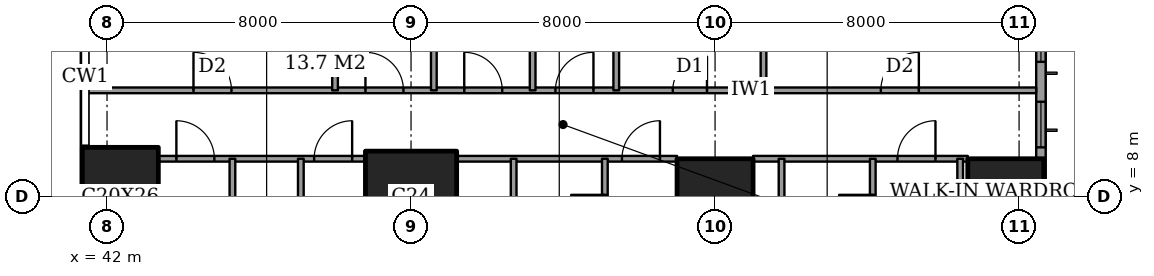
"""IFC4 building model, lengths in metres.
Left out: names, types, materials, properties, quantities, classifications, styles, units other than length and angle.
Written with IfcOpenShell. Run it as: python <this file> out.ifc"""

import sys

from ifc_helpers import new_model, si_unit, direction, frame, frame_2d, origin, origin_2d, place, context, subcontext, project, spatial, rectangle, extrude, element, fill, save


model = new_model("IFC4")
c1 = context("Model", 3, precision=1e-05, world=origin(), true_north=direction((0.0, 1.0)))
c2 = subcontext(c1, "Body", "Model", "MODEL_VIEW")
j1 = project(units=[si_unit("LENGTHUNIT", "METRE"), si_unit("PLANEANGLEUNIT", "RADIAN")], contexts=[c1])
p1 = place(None, origin())
s1 = spatial("IfcSite", under=j1, at=p1, CompositionType="ELEMENT")
p2 = place(p1, origin())
s2 = spatial("IfcBuilding", under=s1, at=p2, CompositionType="ELEMENT")
p3 = place(p2, frame((0.0, 0.0, 125.0)))
s3 = spatial("IfcBuildingStorey", under=s2, at=p3, CompositionType="ELEMENT", Elevation=125.0)
p4 = place(p3, frame((42.35, 8.0, 0.0), z_axis=(0.0, 0.0, 1.0), x_axis=(1.0, 0.0, 0.0)))
e1 = element("IfcColumn", 1, at=p4, inside=s3, PredefinedType="COLUMN", context=c2, shape_type="SweptSolid", body=[
    extrude(rectangle(XDim=2.0, YDim=2.6, at=origin_2d()), origin(), (0.0, 0.0, 1.0), 3.6),
])
p5 = place(p3, frame((50.0, 8.0, 0.0), z_axis=(0.0, 0.0, 1.0), x_axis=(1.0, 0.0, 0.0)))
e2 = element("IfcColumn", 2, at=p5, inside=s3, PredefinedType="COLUMN", context=c2, shape_type="SweptSolid", body=[
    extrude(rectangle(XDim=2.4, YDim=2.4, at=origin_2d()), origin(), (0.0, 0.0, 1.0), 3.6),
])
for number, where, z_axis, x_axis in (
    (3, (58.0, 8.0, 0.0), (0.0, 0.0, 1.0), (1.0, 0.0, 0.0)),
    (4, (65.65, 8.0, 0.0), (0.0, 0.0, 1.0), (1.0, 0.0, 0.0)),
):
    element("IfcColumn", number, at=place(p3, frame(where, z_axis=z_axis, x_axis=x_axis)), inside=s3, PredefinedType="COLUMN", context=c2, shape_type="SweptSolid", body=[
        extrude(rectangle(XDim=2.0, YDim=2.0, at=origin_2d()), origin(), (0.0, 0.0, 1.0), 3.6),
    ])
p6 = place(p3, frame((66.575, 3.175, 0.0), z_axis=(0.0, 0.0, 1.0), x_axis=(0.0, 1.0, 0.0)))
e5 = element("IfcWall", 5, at=p6, inside=s3, PredefinedType="SOLIDWALL", context=c2, shape_type="SweptSolid", body=[
    extrude(rectangle(XDim=41.65, YDim=0.25, at=frame_2d((20.825, 0.0))), origin(), (0.0, 0.0, 1.0), 3.6),
])
p7 = place(p6, frame((0.775, 0.0, 0.4)))
e6 = element("IfcOpeningElement", 6, at=p7, cuts=e5, PredefinedType="OPENING", context=c2, shape_type="SweptSolid", body=[
    extrude(rectangle(XDim=2.4, YDim=2.2, at=frame_2d((1.2, 1.1))), frame((0.0, 0.135, 0.0), z_axis=(0.0, -1.0, 0.0), x_axis=(1.0, 0.0, 0.0)), (0.0, 0.0, 1.0), 0.27),
])
p8 = place(p6, frame((6.125, 0.0, 0.4)))
e7 = element("IfcOpeningElement", 7, at=p8, cuts=e5, PredefinedType="OPENING", context=c2, shape_type="SweptSolid", body=[
    extrude(rectangle(XDim=1.2, YDim=2.2, at=frame_2d((0.6, 1.1))), frame((0.0, 0.135, 0.0), z_axis=(0.0, -1.0, 0.0), x_axis=(1.0, 0.0, 0.0)), (0.0, 0.0, 1.0), 0.27),
])
p9 = place(p6, frame((8.375, 0.0, 0.4)))
e8 = element("IfcOpeningElement", 8, at=p9, cuts=e5, PredefinedType="OPENING", context=c2, shape_type="SweptSolid", body=[
    extrude(rectangle(XDim=2.4, YDim=2.2, at=frame_2d((1.2, 1.1))), frame((0.0, 0.135, 0.0), z_axis=(0.0, -1.0, 0.0), x_axis=(1.0, 0.0, 0.0)), (0.0, 0.0, 1.0), 0.27),
])
p10 = place(p6, frame((15.775, 0.0, 0.4)))
e9 = element("IfcOpeningElement", 9, at=p10, cuts=e5, PredefinedType="OPENING", context=c2, shape_type="SweptSolid", body=[
    extrude(rectangle(XDim=2.4, YDim=2.2, at=frame_2d((1.2, 1.1))), frame((0.0, 0.135, 0.0), z_axis=(0.0, -1.0, 0.0), x_axis=(1.0, 0.0, 0.0)), (0.0, 0.0, 1.0), 0.27),
])
p11 = place(p6, frame((23.475, 0.0, 0.4)))
e10 = element("IfcOpeningElement", 10, at=p11, cuts=e5, PredefinedType="OPENING", context=c2, shape_type="SweptSolid", body=[
    extrude(rectangle(XDim=2.4, YDim=2.2, at=frame_2d((1.2, 1.1))), frame((0.0, 0.135, 0.0), z_axis=(0.0, -1.0, 0.0), x_axis=(1.0, 0.0, 0.0)), (0.0, 0.0, 1.0), 0.27),
])
p12 = place(p6, frame((30.975, 0.0, 0.4)))
e11 = element("IfcOpeningElement", 11, at=p12, cuts=e5, PredefinedType="OPENING", context=c2, shape_type="SweptSolid", body=[
    extrude(rectangle(XDim=2.4, YDim=2.2, at=frame_2d((1.2, 1.1))), frame((0.0, 0.135, 0.0), z_axis=(0.0, -1.0, 0.0), x_axis=(1.0, 0.0, 0.0)), (0.0, 0.0, 1.0), 0.27),
])
p13 = place(p6, frame((34.5, 0.0, 0.4)))
e12 = element("IfcOpeningElement", 12, at=p13, cuts=e5, PredefinedType="OPENING", context=c2, shape_type="SweptSolid", body=[
    extrude(rectangle(XDim=1.2, YDim=2.2, at=frame_2d((0.6, 1.1))), frame((0.0, 0.135, 0.0), z_axis=(0.0, -1.0, 0.0), x_axis=(1.0, 0.0, 0.0)), (0.0, 0.0, 1.0), 0.27),
])
p14 = place(p6, frame((38.475, 0.0, 0.4)))
e13 = element("IfcOpeningElement", 13, at=p14, cuts=e5, PredefinedType="OPENING", context=c2, shape_type="SweptSolid", body=[
    extrude(rectangle(XDim=2.4, YDim=2.2, at=frame_2d((1.2, 1.1))), frame((0.0, 0.135, 0.0), z_axis=(0.0, -1.0, 0.0), x_axis=(1.0, 0.0, 0.0)), (0.0, 0.0, 1.0), 0.27),
])
p15 = place(p3, frame((43.35, 9.0, 0.0), z_axis=(0.0, 0.0, 1.0), x_axis=(1.0, 0.0, 0.0)))
e14 = element("IfcWall", 14, at=p15, inside=s3, PredefinedType="PARTITIONING", context=c2, shape_type="SweptSolid", body=[
    extrude(rectangle(XDim=5.45, YDim=0.15, at=frame_2d((2.725, 0.0))), origin(), (0.0, 0.0, 1.0), 3.35),
])
p16 = place(p15, frame((4.1, 0.0, 0.0)))
e15 = element("IfcOpeningElement", 15, at=p16, cuts=e14, PredefinedType="OPENING", context=c2, shape_type="SweptSolid", body=[
    extrude(rectangle(XDim=1.0, YDim=2.1, at=frame_2d((0.5, 1.05))), frame((0.0, 0.085, 0.0), z_axis=(0.0, -1.0, 0.0), x_axis=(1.0, 0.0, 0.0)), (0.0, 0.0, 1.0), 0.17),
])
p17 = place(p15, frame((0.475, 0.0, 0.0)))
e16 = element("IfcOpeningElement", 16, at=p17, cuts=e14, PredefinedType="OPENING", context=c2, shape_type="SweptSolid", body=[
    extrude(rectangle(XDim=1.0, YDim=2.1, at=frame_2d((0.5, 1.05))), frame((0.0, 0.085, 0.0), z_axis=(0.0, -1.0, 0.0), x_axis=(1.0, 0.0, 0.0)), (0.0, 0.0, 1.0), 0.17),
])
p18 = place(p3, frame((51.2, 9.0, 0.0), z_axis=(0.0, 0.0, 1.0), x_axis=(1.0, 0.0, 0.0)))
e17 = element("IfcWall", 17, at=p18, inside=s3, PredefinedType="PARTITIONING", context=c2, shape_type="SweptSolid", body=[
    extrude(rectangle(XDim=5.8, YDim=0.15, at=frame_2d((2.9, 0.0))), origin(), (0.0, 0.0, 1.0), 3.35),
])
p19 = place(p18, frame((4.35, 0.0, 0.0)))
e18 = element("IfcOpeningElement", 18, at=p19, cuts=e17, PredefinedType="OPENING", context=c2, shape_type="SweptSolid", body=[
    extrude(rectangle(XDim=1.0, YDim=2.1, at=frame_2d((0.5, 1.05))), frame((0.0, 0.085, 0.0), z_axis=(0.0, -1.0, 0.0), x_axis=(1.0, 0.0, 0.0)), (0.0, 0.0, 1.0), 0.17),
])
p20 = place(p3, frame((59.0, 9.0, 0.0), z_axis=(0.0, 0.0, 1.0), x_axis=(1.0, 0.0, 0.0)))
e19 = element("IfcWall", 19, at=p20, inside=s3, PredefinedType="PARTITIONING", context=c2, shape_type="SweptSolid", body=[
    extrude(rectangle(XDim=5.65, YDim=0.15, at=frame_2d((2.825, 0.0))), origin(), (0.0, 0.0, 1.0), 3.35),
])
p21 = place(p20, frame((3.8, 0.0, 0.0)))
e20 = element("IfcOpeningElement", 20, at=p21, cuts=e19, PredefinedType="OPENING", context=c2, shape_type="SweptSolid", body=[
    extrude(rectangle(XDim=1.0, YDim=2.1, at=frame_2d((0.5, 1.05))), frame((0.0, 0.085, 0.0), z_axis=(0.0, -1.0, 0.0), x_axis=(1.0, 0.0, 0.0)), (0.0, 0.0, 1.0), 0.17),
])
p22 = place(p3, frame((41.439, 10.8, 0.0), z_axis=(0.0, 0.0, 1.0), x_axis=(1.0, 0.0, 0.0)))
e21 = element("IfcWall", 21, at=p22, inside=s3, PredefinedType="PARTITIONING", context=c2, shape_type="SweptSolid", body=[
    extrude(rectangle(XDim=25.011, YDim=0.15, at=frame_2d((12.505, 0.0))), origin(), (0.0, 0.0, 1.0), 3.35),
])
p23 = place(p22, frame((12.361, 0.0, 0.0)))
e22 = element("IfcOpeningElement", 22, at=p23, cuts=e21, PredefinedType="OPENING", context=c2, shape_type="SweptSolid", body=[
    extrude(rectangle(XDim=1.0, YDim=2.1, at=frame_2d((0.5, 1.05))), frame((0.0, 0.085, 0.0), z_axis=(0.0, -1.0, 0.0), x_axis=(1.0, 0.0, 0.0)), (0.0, 0.0, 1.0), 0.17),
])
p24 = place(p22, frame((20.924, 0.0, 0.0)))
e23 = element("IfcOpeningElement", 23, at=p24, cuts=e21, PredefinedType="OPENING", context=c2, shape_type="SweptSolid", body=[
    extrude(rectangle(XDim=1.0, YDim=2.1, at=frame_2d((0.5, 1.05))), frame((0.0, 0.085, 0.0), z_axis=(0.0, -1.0, 0.0), x_axis=(1.0, 0.0, 0.0)), (0.0, 0.0, 1.0), 0.17),
])
p25 = place(p22, frame((15.448, 0.0, 0.0)))
e24 = element("IfcOpeningElement", 24, at=p25, cuts=e21, PredefinedType="OPENING", context=c2, shape_type="SweptSolid", body=[
    extrude(rectangle(XDim=0.9, YDim=2.1, at=frame_2d((0.45, 1.05))), frame((0.0, 0.085, 0.0), z_axis=(0.0, -1.0, 0.0), x_axis=(1.0, 0.0, 0.0)), (0.0, 0.0, 1.0), 0.17),
])
p26 = place(p22, frame((9.961, 0.0, 0.0)))
e25 = element("IfcOpeningElement", 25, at=p26, cuts=e21, PredefinedType="OPENING", context=c2, shape_type="SweptSolid", body=[
    extrude(rectangle(XDim=1.0, YDim=2.1, at=frame_2d((0.5, 1.05))), frame((0.0, 0.085, 0.0), z_axis=(0.0, -1.0, 0.0), x_axis=(1.0, 0.0, 0.0)), (0.0, 0.0, 1.0), 0.17),
])
p27 = place(p22, frame((7.361, 0.0, 0.0)))
e26 = element("IfcOpeningElement", 26, at=p27, cuts=e21, PredefinedType="OPENING", context=c2, shape_type="SweptSolid", body=[
    extrude(rectangle(XDim=1.0, YDim=2.1, at=frame_2d((0.5, 1.05))), frame((0.0, 0.085, 0.0), z_axis=(0.0, -1.0, 0.0), x_axis=(1.0, 0.0, 0.0)), (0.0, 0.0, 1.0), 0.17),
])
p28 = place(p22, frame((2.836, 0.0, 0.0)))
e27 = element("IfcOpeningElement", 27, at=p28, cuts=e21, PredefinedType="OPENING", context=c2, shape_type="SweptSolid", body=[
    extrude(rectangle(XDim=1.0, YDim=2.1, at=frame_2d((0.5, 1.05))), frame((0.0, 0.085, 0.0), z_axis=(0.0, -1.0, 0.0), x_axis=(1.0, 0.0, 0.0)), (0.0, 0.0, 1.0), 0.17),
])
p29 = place(p3, frame((45.3, -0.45, 0.0), z_axis=(0.0, 0.0, 1.0), x_axis=(0.0, 1.0, 0.0)))
e28 = element("IfcWall", 28, at=p29, inside=s3, PredefinedType="PARTITIONING", context=c2, shape_type="SweptSolid", body=[
    extrude(rectangle(XDim=9.45, YDim=0.15, at=frame_2d((4.725, 0.0))), origin(), (0.0, 0.0, 1.0), 3.35),
])
p30 = place(p3, frame((47.1, 5.2, 0.0), z_axis=(0.0, 0.0, 1.0), x_axis=(0.0, 1.0, 0.0)))
e29 = element("IfcWall", 29, at=p30, inside=s3, PredefinedType="PARTITIONING", context=c2, shape_type="SweptSolid", body=[
    extrude(rectangle(XDim=3.8, YDim=0.15, at=frame_2d((1.9, 0.0))), origin(), (0.0, 0.0, 1.0), 3.35),
])
p31 = place(p30, frame((1.45, 0.0, 0.0)))
e30 = element("IfcOpeningElement", 30, at=p31, cuts=e29, PredefinedType="OPENING", context=c2, shape_type="SweptSolid", body=[
    extrude(rectangle(XDim=0.9, YDim=2.1, at=frame_2d((0.45, 1.05))), frame((0.0, 0.085, 0.0), z_axis=(0.0, -1.0, 0.0), x_axis=(1.0, 0.0, 0.0)), (0.0, 0.0, 1.0), 0.17),
])
p32 = place(p3, frame((48.0, 10.8, 0.0), z_axis=(0.0, 0.0, 1.0), x_axis=(0.0, 1.0, 0.0)))
e31 = element("IfcWall", 31, at=p32, inside=s3, PredefinedType="PARTITIONING", context=c2, shape_type="SweptSolid", body=[
    extrude(rectangle(XDim=6.7, YDim=0.15, at=frame_2d((3.35, 0.0))), origin(), (0.0, 0.0, 1.0), 3.35),
])
p33 = place(p3, frame((50.6, 10.8, 0.0), z_axis=(0.0, 0.0, 1.0), x_axis=(0.0, 1.0, 0.0)))
e32 = element("IfcWall", 32, at=p33, inside=s3, PredefinedType="PARTITIONING", context=c2, shape_type="SweptSolid", body=[
    extrude(rectangle(XDim=4.0, YDim=0.15, at=frame_2d((2.0, 0.0))), origin(), (0.0, 0.0, 1.0), 3.35),
])
p34 = place(p3, frame((52.7, -0.45, 0.0), z_axis=(0.0, 0.0, 1.0), x_axis=(0.0, 1.0, 0.0)))
e33 = element("IfcWall", 33, at=p34, inside=s3, PredefinedType="PARTITIONING", context=c2, shape_type="SweptSolid", body=[
    extrude(rectangle(XDim=9.45, YDim=0.15, at=frame_2d((4.725, 0.0))), origin(), (0.0, 0.0, 1.0), 3.35),
])
p35 = place(p34, frame((2.875, 0.0, 0.0)))
e34 = element("IfcOpeningElement", 34, at=p35, cuts=e33, PredefinedType="OPENING", context=c2, shape_type="SweptSolid", body=[
    extrude(rectangle(XDim=0.9, YDim=2.1, at=frame_2d((0.45, 1.05))), frame((0.0, 0.085, 0.0), z_axis=(0.0, -1.0, 0.0), x_axis=(1.0, 0.0, 0.0)), (0.0, 0.0, 1.0), 0.17),
])
p36 = place(p3, frame((53.2, 10.8, 0.0), z_axis=(0.0, 0.0, 1.0), x_axis=(0.0, 1.0, 0.0)))
e35 = element("IfcWall", 35, at=p36, inside=s3, PredefinedType="PARTITIONING", context=c2, shape_type="SweptSolid", body=[
    extrude(rectangle(XDim=6.7, YDim=0.15, at=frame_2d((3.35, 0.0))), origin(), (0.0, 0.0, 1.0), 3.35),
])
p37 = place(p3, frame((55.1, 6.2, 0.0), z_axis=(0.0, 0.0, 1.0), x_axis=(0.0, 1.0, 0.0)))
e36 = element("IfcWall", 36, at=p37, inside=s3, PredefinedType="PARTITIONING", context=c2, shape_type="SweptSolid", body=[
    extrude(rectangle(XDim=2.8, YDim=0.15, at=frame_2d((1.4, 0.0))), origin(), (0.0, 0.0, 1.0), 3.35),
])
p38 = place(p37, frame((0.95, 0.0, 0.0)))
e37 = element("IfcOpeningElement", 37, at=p38, cuts=e36, PredefinedType="OPENING", context=c2, shape_type="SweptSolid", body=[
    extrude(rectangle(XDim=0.9, YDim=2.1, at=frame_2d((0.45, 1.05))), frame((0.0, 0.085, 0.0), z_axis=(0.0, -1.0, 0.0), x_axis=(1.0, 0.0, 0.0)), (0.0, 0.0, 1.0), 0.17),
])
p39 = place(p3, frame((55.4, 10.8, 0.0), z_axis=(0.0, 0.0, 1.0), x_axis=(0.0, 1.0, 0.0)))
e38 = element("IfcWall", 38, at=p39, inside=s3, PredefinedType="PARTITIONING", context=c2, shape_type="SweptSolid", body=[
    extrude(rectangle(XDim=10.8, YDim=0.15, at=frame_2d((5.4, 0.0))), origin(), (0.0, 0.0, 1.0), 3.35),
])
p40 = place(p39, frame((8.25, 0.0, 0.0)))
e39 = element("IfcOpeningElement", 39, at=p40, cuts=e38, PredefinedType="OPENING", context=c2, shape_type="SweptSolid", body=[
    extrude(rectangle(XDim=1.0, YDim=2.1, at=frame_2d((0.5, 1.05))), frame((0.0, 0.085, 0.0), z_axis=(0.0, -1.0, 0.0), x_axis=(1.0, 0.0, 0.0)), (0.0, 0.0, 1.0), 0.17),
])
p41 = place(p3, frame((59.275, 10.8, 0.0), z_axis=(0.0, 0.0, 1.0), x_axis=(0.0, 1.0, 0.0)))
e40 = element("IfcWall", 40, at=p41, inside=s3, PredefinedType="PARTITIONING", context=c2, shape_type="SweptSolid", body=[
    extrude(rectangle(XDim=4.0, YDim=0.15, at=frame_2d((2.0, 0.0))), origin(), (0.0, 0.0, 1.0), 3.35),
])
p42 = place(p3, frame((59.75, -0.45, 0.0), z_axis=(0.0, 0.0, 1.0), x_axis=(0.0, 1.0, 0.0)))
e41 = element("IfcWall", 41, at=p42, inside=s3, PredefinedType="PARTITIONING", context=c2, shape_type="SweptSolid", body=[
    extrude(rectangle(XDim=9.45, YDim=0.15, at=frame_2d((4.725, 0.0))), origin(), (0.0, 0.0, 1.0), 3.35),
])
p43 = place(p42, frame((2.875, 0.0, 0.0)))
e42 = element("IfcOpeningElement", 42, at=p43, cuts=e41, PredefinedType="OPENING", context=c2, shape_type="SweptSolid", body=[
    extrude(rectangle(XDim=0.9, YDim=2.1, at=frame_2d((0.45, 1.05))), frame((0.0, 0.085, 0.0), z_axis=(0.0, -1.0, 0.0), x_axis=(1.0, 0.0, 0.0)), (0.0, 0.0, 1.0), 0.17),
])
p44 = place(p3, frame((62.15, 6.2, 0.0), z_axis=(0.0, 0.0, 1.0), x_axis=(0.0, 1.0, 0.0)))
e43 = element("IfcWall", 43, at=p44, inside=s3, PredefinedType="PARTITIONING", context=c2, shape_type="SweptSolid", body=[
    extrude(rectangle(XDim=2.8, YDim=0.15, at=frame_2d((1.4, 0.0))), origin(), (0.0, 0.0, 1.0), 3.35),
])
p45 = place(p44, frame((0.95, 0.0, 0.0)))
e44 = element("IfcOpeningElement", 44, at=p45, cuts=e43, PredefinedType="OPENING", context=c2, shape_type="SweptSolid", body=[
    extrude(rectangle(XDim=0.9, YDim=2.1, at=frame_2d((0.45, 1.05))), frame((0.0, 0.085, 0.0), z_axis=(0.0, -1.0, 0.0), x_axis=(1.0, 0.0, 0.0)), (0.0, 0.0, 1.0), 0.17),
])
p46 = place(p3, frame((64.45, 3.3, 0.0), z_axis=(0.0, 0.0, 1.0), x_axis=(0.0, 1.0, 0.0)))
e45 = element("IfcWall", 45, at=p46, inside=s3, PredefinedType="PARTITIONING", context=c2, shape_type="SweptSolid", body=[
    extrude(rectangle(XDim=5.7, YDim=0.15, at=frame_2d((2.85, 0.0))), origin(), (0.0, 0.0, 1.0), 3.35),
])
p47 = place(p46, frame((2.4, 0.0, 0.0)))
e46 = element("IfcOpeningElement", 46, at=p47, cuts=e45, PredefinedType="OPENING", context=c2, shape_type="SweptSolid", body=[
    extrude(rectangle(XDim=0.9, YDim=2.1, at=frame_2d((0.45, 1.05))), frame((0.0, 0.085, 0.0), z_axis=(0.0, -1.0, 0.0), x_axis=(1.0, 0.0, 0.0)), (0.0, 0.0, 1.0), 0.17),
])
p48 = place(p8, origin())
e47 = element("IfcWindow", 47, at=p48, inside=s3, PartitioningType="SINGLE_PANEL", PredefinedType="WINDOW", context=c2, shape_type="SweptSolid", body=[
    extrude(rectangle(XDim=1.2, YDim=2.2, at=frame_2d((0.6, 1.1))), frame((0.0, 0.03, 0.0), z_axis=(0.0, -1.0, 0.0), x_axis=(1.0, 0.0, 0.0)), (0.0, 0.0, 1.0), 0.06),
])
fill(e7, e47)
p49 = place(p9, origin())
e48 = element("IfcWindow", 48, at=p49, inside=s3, PartitioningType="SINGLE_PANEL", PredefinedType="WINDOW", context=c2, shape_type="SweptSolid", body=[
    extrude(rectangle(XDim=2.4, YDim=2.2, at=frame_2d((1.2, 1.1))), frame((0.0, 0.03, 0.0), z_axis=(0.0, -1.0, 0.0), x_axis=(1.0, 0.0, 0.0)), (0.0, 0.0, 1.0), 0.06),
])
fill(e8, e48)
p50 = place(p45, origin())
e49 = element("IfcDoor", 49, at=p50, inside=s3, OperationType="SINGLE_SWING_LEFT", PredefinedType="DOOR", context=c2, shape_type="SweptSolid", body=[
    extrude(rectangle(XDim=0.9, YDim=2.1, at=frame_2d((0.45, 1.05))), frame((0.0, 0.025, 0.0), z_axis=(0.0, -1.0, 0.0), x_axis=(1.0, 0.0, 0.0)), (0.0, 0.0, 1.0), 0.05),
])
fill(e44, e49)
p51 = place(p21, origin())
e50 = element("IfcDoor", 50, at=p51, inside=s3, OperationType="SINGLE_SWING_LEFT", PredefinedType="DOOR", context=c2, shape_type="SweptSolid", body=[
    extrude(rectangle(XDim=1.0, YDim=2.1, at=frame_2d((0.5, 1.05))), frame((0.0, 0.025, 0.0), z_axis=(0.0, -1.0, 0.0), x_axis=(1.0, 0.0, 0.0)), (0.0, 0.0, 1.0), 0.05),
])
fill(e20, e50)
p52 = place(p38, origin())
e51 = element("IfcDoor", 51, at=p52, inside=s3, OperationType="SINGLE_SWING_LEFT", PredefinedType="DOOR", context=c2, shape_type="SweptSolid", body=[
    extrude(rectangle(XDim=0.9, YDim=2.1, at=frame_2d((0.45, 1.05))), frame((0.0, 0.025, 0.0), z_axis=(0.0, -1.0, 0.0), x_axis=(1.0, 0.0, 0.0)), (0.0, 0.0, 1.0), 0.05),
])
fill(e37, e51)
p53 = place(p19, origin())
e52 = element("IfcDoor", 52, at=p53, inside=s3, OperationType="SINGLE_SWING_LEFT", PredefinedType="DOOR", context=c2, shape_type="SweptSolid", body=[
    extrude(rectangle(XDim=1.0, YDim=2.1, at=frame_2d((0.5, 1.05))), frame((0.0, 0.025, 0.0), z_axis=(0.0, -1.0, 0.0), x_axis=(1.0, 0.0, 0.0)), (0.0, 0.0, 1.0), 0.05),
])
fill(e18, e52)
p54 = place(p16, origin())
e53 = element("IfcDoor", 53, at=p54, inside=s3, OperationType="SINGLE_SWING_LEFT", PredefinedType="DOOR", context=c2, shape_type="SweptSolid", body=[
    extrude(rectangle(XDim=1.0, YDim=2.1, at=frame_2d((0.5, 1.05))), frame((0.0, 0.025, 0.0), z_axis=(0.0, -1.0, 0.0), x_axis=(1.0, 0.0, 0.0)), (0.0, 0.0, 1.0), 0.05),
])
fill(e15, e53)
p55 = place(p17, origin())
e54 = element("IfcDoor", 54, at=p55, inside=s3, OperationType="SINGLE_SWING_RIGHT", PredefinedType="DOOR", context=c2, shape_type="SweptSolid", body=[
    extrude(rectangle(XDim=1.0, YDim=2.1, at=frame_2d((0.5, 1.05))), frame((0.0, 0.025, 0.0), z_axis=(0.0, -1.0, 0.0), x_axis=(1.0, 0.0, 0.0)), (0.0, 0.0, 1.0), 0.05),
])
fill(e16, e54)
p56 = place(p23, origin())
e55 = element("IfcDoor", 55, at=p56, inside=s3, OperationType="SINGLE_SWING_LEFT", PredefinedType="DOOR", context=c2, shape_type="SweptSolid", body=[
    extrude(rectangle(XDim=1.0, YDim=2.1, at=frame_2d((0.5, 1.05))), frame((0.0, 0.025, 0.0), z_axis=(0.0, -1.0, 0.0), x_axis=(1.0, 0.0, 0.0)), (0.0, 0.0, 1.0), 0.05),
])
fill(e22, e55)
p57 = place(p24, origin())
e56 = element("IfcDoor", 56, at=p57, inside=s3, OperationType="SINGLE_SWING_LEFT", PredefinedType="DOOR", context=c2, shape_type="SweptSolid", body=[
    extrude(rectangle(XDim=1.0, YDim=2.1, at=frame_2d((0.5, 1.05))), frame((0.0, 0.025, 0.0), z_axis=(0.0, -1.0, 0.0), x_axis=(1.0, 0.0, 0.0)), (0.0, 0.0, 1.0), 0.05),
])
fill(e23, e56)
p58 = place(p25, origin())
e57 = element("IfcDoor", 57, at=p58, inside=s3, OperationType="SINGLE_SWING_LEFT", PredefinedType="DOOR", context=c2, shape_type="SweptSolid", body=[
    extrude(rectangle(XDim=0.9, YDim=2.1, at=frame_2d((0.45, 1.05))), frame((0.0, 0.025, 0.0), z_axis=(0.0, -1.0, 0.0), x_axis=(1.0, 0.0, 0.0)), (0.0, 0.0, 1.0), 0.05),
])
fill(e24, e57)
p59 = place(p26, origin())
e58 = element("IfcDoor", 58, at=p59, inside=s3, OperationType="SINGLE_SWING_RIGHT", PredefinedType="DOOR", context=c2, shape_type="SweptSolid", body=[
    extrude(rectangle(XDim=1.0, YDim=2.1, at=frame_2d((0.5, 1.05))), frame((0.0, 0.025, 0.0), z_axis=(0.0, -1.0, 0.0), x_axis=(1.0, 0.0, 0.0)), (0.0, 0.0, 1.0), 0.05),
])
fill(e25, e58)
p60 = place(p27, origin())
e59 = element("IfcDoor", 59, at=p60, inside=s3, OperationType="SINGLE_SWING_RIGHT", PredefinedType="DOOR", context=c2, shape_type="SweptSolid", body=[
    extrude(rectangle(XDim=1.0, YDim=2.1, at=frame_2d((0.5, 1.05))), frame((0.0, 0.025, 0.0), z_axis=(0.0, -1.0, 0.0), x_axis=(1.0, 0.0, 0.0)), (0.0, 0.0, 1.0), 0.05),
])
fill(e26, e59)
p61 = place(p28, origin())
e60 = element("IfcDoor", 60, at=p61, inside=s3, OperationType="SINGLE_SWING_RIGHT", PredefinedType="DOOR", context=c2, shape_type="SweptSolid", body=[
    extrude(rectangle(XDim=1.0, YDim=2.1, at=frame_2d((0.5, 1.05))), frame((0.0, 0.025, 0.0), z_axis=(0.0, -1.0, 0.0), x_axis=(1.0, 0.0, 0.0)), (0.0, 0.0, 1.0), 0.05),
])
fill(e27, e60)
save(model, sys.argv[1])
